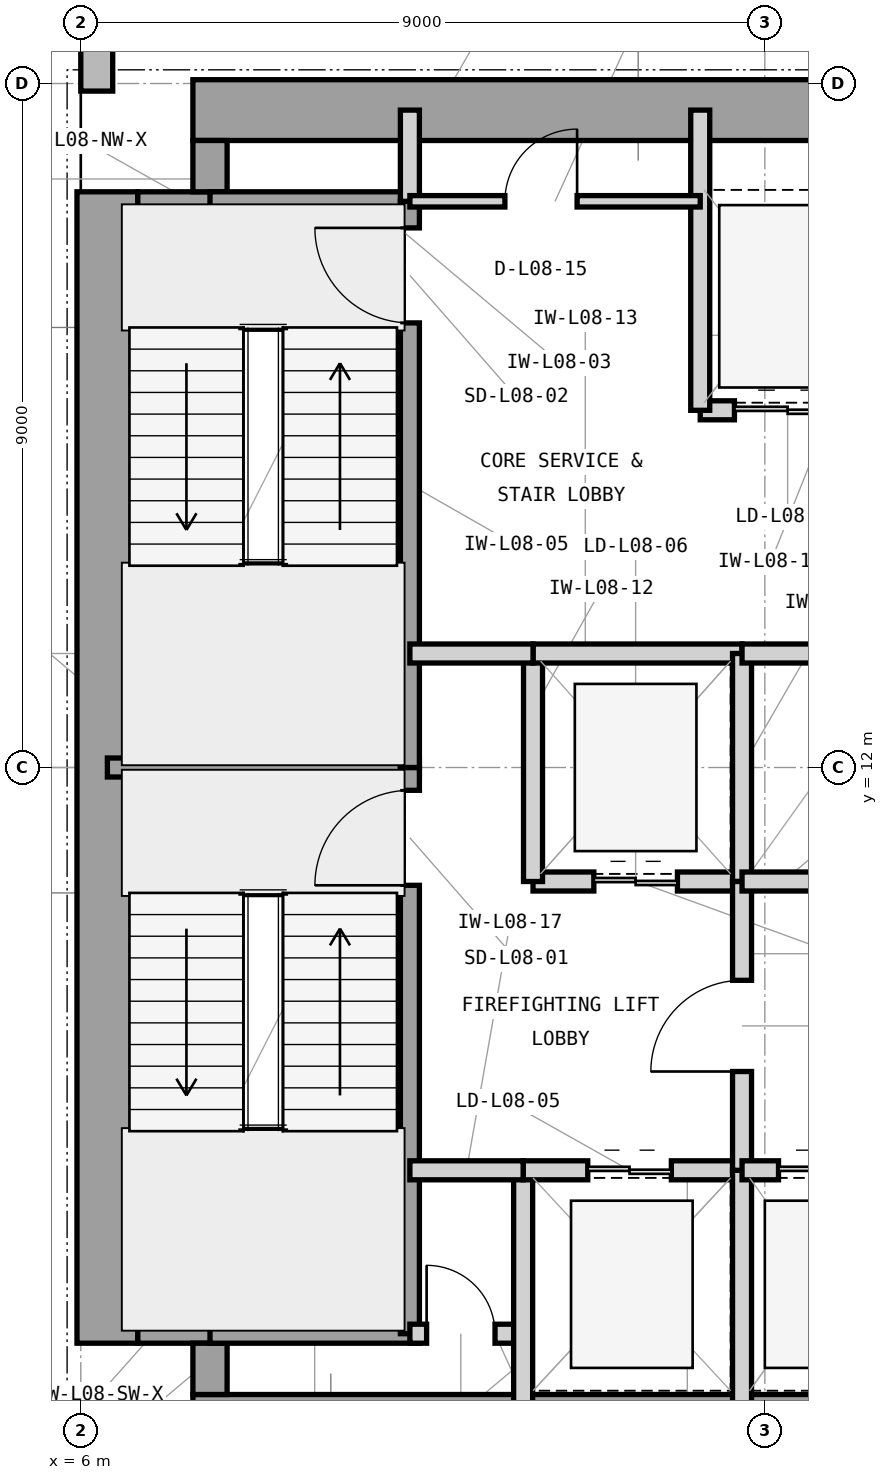
"""IFC4 building model, lengths in metres.
Left out: names, types, materials, properties, quantities, classifications, styles, units other than length and angle.
Written with IfcOpenShell. Run it as: python <this file> out.ifc"""

import sys

from ifc_helpers import new_model, si_unit, direction, frame, frame_2d, origin, place, context, subcontext, project, spatial, rectangle, extrude, element, fill, save


model = new_model("IFC4")
c1 = context("Model", 3, precision=1e-05, world=origin(), true_north=direction((0.0, 1.0)))
c2 = subcontext(c1, "Body", "Model", "MODEL_VIEW")
j1 = project(units=[si_unit("LENGTHUNIT", "METRE"), si_unit("PLANEANGLEUNIT", "RADIAN")], contexts=[c1])
p1 = place(None, origin())
s1 = spatial("IfcSite", under=j1, at=p1, CompositionType="ELEMENT")
p2 = place(p1, origin())
s2 = spatial("IfcBuilding", under=s1, at=p2, CompositionType="ELEMENT")
p3 = place(p2, frame((0.0, 0.0, 38.4)))
s3 = spatial("IfcBuildingStorey", under=s2, at=p3, CompositionType="ELEMENT", Elevation=38.4)
p4 = place(p3, frame((7.475, 3.35, 0.0), z_axis=(0.0, 0.0, 1.0), x_axis=(1.0, 0.0, 0.0)))
e1 = element("IfcWall", 1, at=p4, inside=s3, PredefinedType="SHEAR", context=c2, shape_type="SweptSolid", body=[
    extrude(rectangle(XDim=16.575, YDim=0.8, at=frame_2d((8.288, 0.0))), origin(), (0.0, 0.0, 1.0), 4.2),
])
p5 = place(p3, frame((6.35, 4.425, 0.0), z_axis=(0.0, 0.0, 1.0), x_axis=(0.0, 1.0, 0.0)))
e2 = element("IfcWall", 2, at=p5, inside=s3, PredefinedType="SHEAR", context=c2, shape_type="SweptSolid", body=[
    extrude(rectangle(XDim=15.15, YDim=0.8, at=frame_2d((7.575, 0.0))), origin(), (0.0, 0.0, 1.0), 4.2),
])
p6 = place(p3, frame((7.475, 20.65, 0.0), z_axis=(0.0, 0.0, 1.0), x_axis=(1.0, 0.0, 0.0)))
e3 = element("IfcWall", 3, at=p6, inside=s3, PredefinedType="SHEAR", context=c2, shape_type="SweptSolid", body=[
    extrude(rectangle(XDim=12.325, YDim=0.8, at=frame_2d((6.163, 0.0))), origin(), (0.0, 0.0, 1.0), 4.2),
])
p7 = place(p3, frame((6.75, 4.65, 0.0), z_axis=(0.0, 0.0, 1.0), x_axis=(1.0, 0.0, 0.0)))
e4 = element("IfcWall", 4, at=p7, inside=s3, PredefinedType="SHEAR", context=c2, shape_type="SweptSolid", body=[
    extrude(rectangle(XDim=1.175, YDim=0.45, at=frame_2d((0.587, 0.0))), origin(), (0.0, 0.0, 1.0), 4.2),
])
p8 = place(p3, frame((7.7, 3.75, 0.0), z_axis=(0.0, 0.0, 1.0), x_axis=(0.0, 1.0, 0.0)))
e5 = element("IfcWall", 5, at=p8, inside=s3, PredefinedType="SHEAR", context=c2, shape_type="SweptSolid", body=[
    extrude(rectangle(XDim=0.675, YDim=0.45, at=frame_2d((0.337, 0.0))), origin(), (0.0, 0.0, 1.0), 4.2),
])
p9 = place(p3, frame((6.75, 19.35, 0.0), z_axis=(0.0, 0.0, 1.0), x_axis=(1.0, 0.0, 0.0)))
e6 = element("IfcWall", 6, at=p9, inside=s3, PredefinedType="SHEAR", context=c2, shape_type="SweptSolid", body=[
    extrude(rectangle(XDim=1.175, YDim=0.45, at=frame_2d((0.587, 0.0))), origin(), (0.0, 0.0, 1.0), 4.2),
])
p10 = place(p3, frame((7.7, 19.575, 0.0), z_axis=(0.0, 0.0, 1.0), x_axis=(0.0, 1.0, 0.0)))
e7 = element("IfcWall", 7, at=p10, inside=s3, PredefinedType="SHEAR", context=c2, shape_type="SweptSolid", body=[
    extrude(rectangle(XDim=0.675, YDim=0.45, at=frame_2d((0.337, 0.0))), origin(), (0.0, 0.0, 1.0), 4.2),
])
p11 = place(p3, frame((6.21, 49.4, 0.0), z_axis=(0.0, 0.0, 1.0), x_axis=(0.0, -1.0, 0.0)))
e8 = element("IfcWall", 8, at=p11, inside=s3, PredefinedType="STANDARD", context=c2, shape_type="SweptSolid", body=[
    extrude(rectangle(XDim=28.5, YDim=0.42, at=frame_2d((14.25, 0.0))), origin(), (0.0, 0.0, 1.0), 3.98),
])
p12 = place(p11, frame((15.225, 0.0, 0.85)))
e9 = element("IfcOpeningElement", 9, at=p12, cuts=e8, PredefinedType="OPENING", context=c2, shape_type="SweptSolid", body=[
    extrude(rectangle(XDim=2.8, YDim=2.45, at=frame_2d((1.4, 1.225))), frame((0.0, 0.22, 0.0), z_axis=(0.0, -1.0, 0.0), x_axis=(1.0, 0.0, 0.0)), (0.0, 0.0, 1.0), 0.44),
])
p13 = place(p3, frame((6.35, 12.0, 0.0), z_axis=(0.0, 0.0, 1.0), x_axis=(1.0, 0.0, 0.0)))
e10 = element("IfcWall", 10, at=p13, inside=s3, PredefinedType="SHEAR", context=c2, shape_type="SweptSolid", body=[
    extrude(rectangle(XDim=4.105, YDim=0.25, at=frame_2d((2.052, 0.0))), origin(), (0.0, 0.0, 1.0), 4.2),
])
for number, where, z_axis, x_axis in (
    (11, (7.7, 4.55, 0.0), (0.0, 0.0, 1.0), (1.0, 0.0, 0.0)),
    (12, (7.7, 19.45, 0.0), (0.0, 0.0, 1.0), (1.0, 0.0, 0.0)),
):
    element("IfcWall", number, at=place(p3, frame(where, z_axis=z_axis, x_axis=x_axis)), inside=s3, PredefinedType="SHEAR", context=c2, shape_type="SweptSolid", body=[
        extrude(rectangle(XDim=2.755, YDim=0.25, at=frame_2d((1.377, 0.0))), origin(), (0.0, 0.0, 1.0), 4.2),
    ])
p14 = place(p3, frame((10.33, 4.55, 0.0), z_axis=(0.0, 0.0, 1.0), x_axis=(0.0, 1.0, 0.0)))
e13 = element("IfcWall", 13, at=p14, inside=s3, PredefinedType="SHEAR", context=c2, shape_type="SweptSolid", body=[
    extrude(rectangle(XDim=7.45, YDim=0.25, at=frame_2d((3.725, 0.0))), origin(), (0.0, 0.0, 1.0), 4.2),
])
p15 = place(p14, frame((5.9, 0.0, 0.0)))
e14 = element("IfcOpeningElement", 14, at=p15, cuts=e13, PredefinedType="OPENING", context=c2, shape_type="SweptSolid", body=[
    extrude(rectangle(XDim=1.25, YDim=2.2, at=frame_2d((0.625, 1.1))), frame((0.0, 0.135, 0.0), z_axis=(0.0, -1.0, 0.0), x_axis=(1.0, 0.0, 0.0)), (0.0, 0.0, 1.0), 0.27),
])
p16 = place(p3, frame((10.33, 12.0, 0.0), z_axis=(0.0, 0.0, 1.0), x_axis=(0.0, 1.0, 0.0)))
e15 = element("IfcWall", 15, at=p16, inside=s3, PredefinedType="SHEAR", context=c2, shape_type="SweptSolid", body=[
    extrude(rectangle(XDim=7.45, YDim=0.25, at=frame_2d((3.725, 0.0))), origin(), (0.0, 0.0, 1.0), 4.2),
])
p17 = place(p16, frame((5.85, 0.0, 0.0)))
e16 = element("IfcOpeningElement", 16, at=p17, cuts=e15, PredefinedType="OPENING", context=c2, shape_type="SweptSolid", body=[
    extrude(rectangle(XDim=1.25, YDim=2.2, at=frame_2d((0.625, 1.1))), frame((0.0, 0.135, 0.0), z_axis=(0.0, -1.0, 0.0), x_axis=(1.0, 0.0, 0.0)), (0.0, 0.0, 1.0), 0.27),
])
p18 = place(p3, frame((10.33, 4.55, 0.0), z_axis=(0.0, 0.0, 1.0), x_axis=(1.0, 0.0, 0.0)))
e17 = element("IfcWall", 17, at=p18, inside=s3, PredefinedType="PARTITIONING", context=c2, shape_type="SweptSolid", body=[
    extrude(rectangle(XDim=1.49, YDim=0.25, at=frame_2d((0.745, 0.0))), origin(), (0.0, 0.0, 1.0), 3.97),
])
p19 = place(p18, frame((0.22, 0.0, 0.0)))
e18 = element("IfcOpeningElement", 18, at=p19, cuts=e17, PredefinedType="OPENING", context=c2, shape_type="SweptSolid", body=[
    extrude(rectangle(XDim=0.9, YDim=2.1, at=frame_2d((0.45, 1.05))), frame((0.0, 0.135, 0.0), z_axis=(0.0, -1.0, 0.0), x_axis=(1.0, 0.0, 0.0)), (0.0, 0.0, 1.0), 0.27),
])
p20 = place(p3, frame((11.82, 3.35, 0.0), z_axis=(0.0, 0.0, 1.0), x_axis=(0.0, 1.0, 0.0)))
e19 = element("IfcWall", 19, at=p20, inside=s3, PredefinedType="PARTITIONING", context=c2, shape_type="SweptSolid", body=[
    extrude(rectangle(XDim=3.35, YDim=0.25, at=frame_2d((1.675, 0.0))), origin(), (0.0, 0.0, 1.0), 3.97),
])
p21 = place(p3, frame((10.33, 19.45, 0.0), z_axis=(0.0, 0.0, 1.0), x_axis=(0.0, 1.0, 0.0)))
e20 = element("IfcWall", 20, at=p21, inside=s3, PredefinedType="PARTITIONING", context=c2, shape_type="SweptSolid", body=[
    extrude(rectangle(XDim=1.2, YDim=0.25, at=frame_2d((0.6, 0.0))), origin(), (0.0, 0.0, 1.0), 3.114),
])
p22 = place(p3, frame((11.82, 6.7, 0.0), z_axis=(0.0, 0.0, 1.0), x_axis=(1.0, 0.0, 0.0)))
e21 = element("IfcWall", 21, at=p22, inside=s3, PredefinedType="PARTITIONING", context=c2, shape_type="SweptSolid", body=[
    extrude(rectangle(XDim=2.88, YDim=0.25, at=frame_2d((1.44, 0.0))), origin(), (0.0, 0.0, 1.0), 3.426),
])
p23 = place(p22, frame((0.85, 0.0, 0.0)))
e22 = element("IfcOpeningElement", 22, at=p23, cuts=e21, PredefinedType="OPENING", context=c2, shape_type="SweptSolid", body=[
    extrude(rectangle(XDim=1.1, YDim=2.25, at=frame_2d((0.55, 1.125))), frame((0.0, 0.135, 0.0), z_axis=(0.0, -1.0, 0.0), x_axis=(1.0, 0.0, 0.0)), (0.0, 0.0, 1.0), 0.27),
])
p24 = place(p3, frame((14.7, 3.35, 0.0), z_axis=(0.0, 0.0, 1.0), x_axis=(0.0, 1.0, 0.0)))
e23 = element("IfcWall", 23, at=p24, inside=s3, PredefinedType="PARTITIONING", context=c2, shape_type="SweptSolid", body=[
    extrude(rectangle(XDim=3.35, YDim=0.25, at=frame_2d((1.675, 0.0))), origin(), (0.0, 0.0, 1.0), 3.97),
])
p25 = place(p3, frame((11.95, 10.5, 0.0), z_axis=(0.0, 0.0, 1.0), x_axis=(1.0, 0.0, 0.0)))
e24 = element("IfcWall", 24, at=p25, inside=s3, PredefinedType="PARTITIONING", context=c2, shape_type="SweptSolid", body=[
    extrude(rectangle(XDim=2.75, YDim=0.25, at=frame_2d((1.375, 0.0))), origin(), (0.0, 0.0, 1.0), 3.426),
])
p26 = place(p25, frame((0.8, 0.0, 0.0)))
e25 = element("IfcOpeningElement", 25, at=p26, cuts=e24, PredefinedType="OPENING", context=c2, shape_type="SweptSolid", body=[
    extrude(rectangle(XDim=1.1, YDim=2.25, at=frame_2d((0.55, 1.125))), frame((0.0, 0.135, 0.0), z_axis=(0.0, -1.0, 0.0), x_axis=(1.0, 0.0, 0.0)), (0.0, 0.0, 1.0), 0.27),
])
p27 = place(p3, frame((11.95, 10.5, 0.0), z_axis=(0.0, 0.0, 1.0), x_axis=(0.0, 1.0, 0.0)))
e26 = element("IfcWall", 26, at=p27, inside=s3, PredefinedType="PARTITIONING", context=c2, shape_type="SweptSolid", body=[
    extrude(rectangle(XDim=3.0, YDim=0.25, at=frame_2d((1.5, 0.0))), origin(), (0.0, 0.0, 1.0), 3.97),
])
p28 = place(p3, frame((11.95, 13.5, 0.0), z_axis=(0.0, 0.0, 1.0), x_axis=(1.0, 0.0, 0.0)))
e27 = element("IfcWall", 27, at=p28, inside=s3, PredefinedType="PARTITIONING", context=c2, shape_type="SweptSolid", body=[
    extrude(rectangle(XDim=2.75, YDim=0.25, at=frame_2d((1.375, 0.0))), origin(), (0.0, 0.0, 1.0), 3.426),
])
p29 = place(p3, frame((14.7, 10.5, 0.0), z_axis=(0.0, 0.0, 1.0), x_axis=(0.0, 1.0, 0.0)))
e28 = element("IfcWall", 28, at=p29, inside=s3, PredefinedType="PARTITIONING", context=c2, shape_type="SweptSolid", body=[
    extrude(rectangle(XDim=3.0, YDim=0.25, at=frame_2d((1.5, 0.0))), origin(), (0.0, 0.0, 1.0), 3.97),
])
p30 = place(p3, frame((14.7, 6.7, 0.0), z_axis=(0.0, 0.0, 1.0), x_axis=(0.0, 1.0, 0.0)))
e29 = element("IfcWall", 29, at=p30, inside=s3, PredefinedType="PARTITIONING", context=c2, shape_type="SweptSolid", body=[
    extrude(rectangle(XDim=3.8, YDim=0.25, at=frame_2d((1.9, 0.0))), origin(), (0.0, 0.0, 1.0), 3.97),
])
p31 = place(p30, frame((1.3, 0.0, 0.0)))
e30 = element("IfcOpeningElement", 30, at=p31, cuts=e29, PredefinedType="OPENING", context=c2, shape_type="SweptSolid", body=[
    extrude(rectangle(XDim=1.2, YDim=2.2, at=frame_2d((0.6, 1.1))), frame((0.0, 0.135, 0.0), z_axis=(0.0, -1.0, 0.0), x_axis=(1.0, 0.0, 0.0)), (0.0, 0.0, 1.0), 0.27),
])
p32 = place(p3, frame((10.33, 13.5, 0.0), z_axis=(0.0, 0.0, 1.0), x_axis=(1.0, 0.0, 0.0)))
e31 = element("IfcWall", 31, at=p32, inside=s3, PredefinedType="PARTITIONING", context=c2, shape_type="SweptSolid", body=[
    extrude(rectangle(XDim=1.62, YDim=0.25, at=frame_2d((0.81, 0.0))), origin(), (0.0, 0.0, 1.0), 3.426),
])
p33 = place(p3, frame((10.33, 6.7, 0.0), z_axis=(0.0, 0.0, 1.0), x_axis=(1.0, 0.0, 0.0)))
e32 = element("IfcWall", 32, at=p33, inside=s3, PredefinedType="PARTITIONING", context=c2, shape_type="SweptSolid", body=[
    extrude(rectangle(XDim=1.49, YDim=0.25, at=frame_2d((0.745, 0.0))), origin(), (0.0, 0.0, 1.0), 3.426),
])
p34 = place(p3, frame((14.15, 16.7, 0.0), z_axis=(0.0, 0.0, 1.0), x_axis=(1.0, 0.0, 0.0)))
e33 = element("IfcWall", 33, at=p34, inside=s3, PredefinedType="PARTITIONING", context=c2, shape_type="SweptSolid", body=[
    extrude(rectangle(XDim=2.3, YDim=0.25, at=frame_2d((1.15, 0.0))), origin(), (0.0, 0.0, 1.0), 3.426),
])
p35 = place(p34, frame((0.45, 0.0, 0.0)))
e34 = element("IfcOpeningElement", 34, at=p35, cuts=e33, PredefinedType="OPENING", context=c2, shape_type="SweptSolid", body=[
    extrude(rectangle(XDim=1.4, YDim=2.35, at=frame_2d((0.7, 1.175))), frame((0.0, 0.135, 0.0), z_axis=(0.0, -1.0, 0.0), x_axis=(1.0, 0.0, 0.0)), (0.0, 0.0, 1.0), 0.27),
])
p36 = place(p3, frame((14.15, 16.7, 0.0), z_axis=(0.0, 0.0, 1.0), x_axis=(0.0, 1.0, 0.0)))
e35 = element("IfcWall", 35, at=p36, inside=s3, PredefinedType="PARTITIONING", context=c2, shape_type="SweptSolid", body=[
    extrude(rectangle(XDim=3.95, YDim=0.25, at=frame_2d((1.975, 0.0))), origin(), (0.0, 0.0, 1.0), 3.97),
])
p37 = place(p3, frame((14.7, 6.7, 0.0), z_axis=(0.0, 0.0, 1.0), x_axis=(1.0, 0.0, 0.0)))
e36 = element("IfcWall", 36, at=p37, inside=s3, PredefinedType="PARTITIONING", context=c2, shape_type="SweptSolid", body=[
    extrude(rectangle(XDim=2.15, YDim=0.25, at=frame_2d((1.075, 0.0))), origin(), (0.0, 0.0, 1.0), 3.426),
])
p38 = place(p37, frame((0.48, 0.0, 0.0)))
e37 = element("IfcOpeningElement", 37, at=p38, cuts=e36, PredefinedType="OPENING", context=c2, shape_type="SweptSolid", body=[
    extrude(rectangle(XDim=1.15, YDim=2.25, at=frame_2d((0.575, 1.125))), frame((0.0, 0.135, 0.0), z_axis=(0.0, -1.0, 0.0), x_axis=(1.0, 0.0, 0.0)), (0.0, 0.0, 1.0), 0.27),
])
p39 = place(p3, frame((14.7, 10.5, 0.0), z_axis=(0.0, 0.0, 1.0), x_axis=(1.0, 0.0, 0.0)))
e38 = element("IfcWall", 38, at=p39, inside=s3, PredefinedType="PARTITIONING", context=c2, shape_type="SweptSolid", body=[
    extrude(rectangle(XDim=2.15, YDim=0.25, at=frame_2d((1.075, 0.0))), origin(), (0.0, 0.0, 1.0), 3.426),
])
p40 = place(p3, frame((14.7, 13.5, 0.0), z_axis=(0.0, 0.0, 1.0), x_axis=(1.0, 0.0, 0.0)))
e39 = element("IfcWall", 39, at=p40, inside=s3, PredefinedType="PARTITIONING", context=c2, shape_type="SweptSolid", body=[
    extrude(rectangle(XDim=8.95, YDim=0.25, at=frame_2d((4.475, 0.0))), origin(), (0.0, 0.0, 1.0), 3.426),
])
p41 = place(p3, frame((10.33, 19.45, 0.0), z_axis=(0.0, 0.0, 1.0), x_axis=(1.0, 0.0, 0.0)))
e40 = element("IfcWall", 40, at=p41, inside=s3, PredefinedType="PARTITIONING", context=c2, shape_type="SweptSolid", body=[
    extrude(rectangle(XDim=3.82, YDim=0.15, at=frame_2d((1.91, 0.0))), origin(), (0.0, 0.0, 1.0), 3.97),
])
p42 = place(p41, frame((1.25, 0.0, 0.0)))
e41 = element("IfcOpeningElement", 41, at=p42, cuts=e40, PredefinedType="OPENING", context=c2, shape_type="SweptSolid", body=[
    extrude(rectangle(XDim=0.95, YDim=2.1, at=frame_2d((0.475, 1.05))), frame((0.0, 0.085, 0.0), z_axis=(0.0, -1.0, 0.0), x_axis=(1.0, 0.0, 0.0)), (0.0, 0.0, 1.0), 0.17),
])
p43 = place(p15, origin())
e42 = element("IfcDoor", 42, at=p43, inside=s3, OperationType="SINGLE_SWING_LEFT", PredefinedType="DOOR", context=c2, shape_type="SweptSolid", body=[
    extrude(rectangle(XDim=1.25, YDim=2.2, at=frame_2d((0.625, 1.1))), frame((0.0, 0.025, 0.0), z_axis=(0.0, -1.0, 0.0), x_axis=(1.0, 0.0, 0.0)), (0.0, 0.0, 1.0), 0.05),
])
fill(e14, e42)
p44 = place(p17, origin())
e43 = element("IfcDoor", 43, at=p44, inside=s3, OperationType="SINGLE_SWING_RIGHT", PredefinedType="DOOR", context=c2, shape_type="SweptSolid", body=[
    extrude(rectangle(XDim=1.25, YDim=2.2, at=frame_2d((0.625, 1.1))), frame((0.0, 0.025, 0.0), z_axis=(0.0, -1.0, 0.0), x_axis=(1.0, 0.0, 0.0)), (0.0, 0.0, 1.0), 0.05),
])
fill(e16, e43)
p45 = place(p19, origin())
e44 = element("IfcDoor", 44, at=p45, inside=s3, OperationType="SINGLE_SWING_LEFT", PredefinedType="TRAPDOOR", context=c2, shape_type="SweptSolid", body=[
    extrude(rectangle(XDim=0.9, YDim=2.1, at=frame_2d((0.45, 1.05))), frame((0.0, 0.025, 0.0), z_axis=(0.0, -1.0, 0.0), x_axis=(1.0, 0.0, 0.0)), (0.0, 0.0, 1.0), 0.05),
])
fill(e18, e44)
p46 = place(p23, origin())
e45 = element("IfcDoor", 45, at=p46, inside=s3, OperationType="DOUBLE_DOOR_SLIDING", PredefinedType="DOOR", context=c2, shape_type="SweptSolid", body=[
    extrude(rectangle(XDim=1.1, YDim=2.25, at=frame_2d((0.55, 1.125))), frame((0.0, 0.025, 0.0), z_axis=(0.0, -1.0, 0.0), x_axis=(1.0, 0.0, 0.0)), (0.0, 0.0, 1.0), 0.05),
])
fill(e22, e45)
p47 = place(p26, origin())
e46 = element("IfcDoor", 46, at=p47, inside=s3, OperationType="DOUBLE_DOOR_SLIDING", PredefinedType="DOOR", context=c2, shape_type="SweptSolid", body=[
    extrude(rectangle(XDim=1.1, YDim=2.25, at=frame_2d((0.55, 1.125))), frame((0.0, 0.025, 0.0), z_axis=(0.0, -1.0, 0.0), x_axis=(1.0, 0.0, 0.0)), (0.0, 0.0, 1.0), 0.05),
])
fill(e25, e46)
p48 = place(p31, origin())
e47 = element("IfcDoor", 47, at=p48, inside=s3, OperationType="SINGLE_SWING_LEFT", PredefinedType="DOOR", context=c2, shape_type="SweptSolid", body=[
    extrude(rectangle(XDim=1.2, YDim=2.2, at=frame_2d((0.6, 1.1))), frame((0.0, 0.025, 0.0), z_axis=(0.0, -1.0, 0.0), x_axis=(1.0, 0.0, 0.0)), (0.0, 0.0, 1.0), 0.05),
])
fill(e30, e47)
p49 = place(p35, origin())
e48 = element("IfcDoor", 48, at=p49, inside=s3, OperationType="DOUBLE_DOOR_SLIDING", PredefinedType="DOOR", context=c2, shape_type="SweptSolid", body=[
    extrude(rectangle(XDim=1.4, YDim=2.35, at=frame_2d((0.7, 1.175))), frame((0.0, 0.025, 0.0), z_axis=(0.0, -1.0, 0.0), x_axis=(1.0, 0.0, 0.0)), (0.0, 0.0, 1.0), 0.05),
])
fill(e34, e48)
p50 = place(p38, origin())
e49 = element("IfcDoor", 49, at=p50, inside=s3, OperationType="DOUBLE_DOOR_SLIDING", PredefinedType="DOOR", context=c2, shape_type="SweptSolid", body=[
    extrude(rectangle(XDim=1.15, YDim=2.25, at=frame_2d((0.575, 1.125))), frame((0.0, 0.025, 0.0), z_axis=(0.0, -1.0, 0.0), x_axis=(1.0, 0.0, 0.0)), (0.0, 0.0, 1.0), 0.05),
])
fill(e37, e49)
p51 = place(p42, origin())
e50 = element("IfcDoor", 50, at=p51, inside=s3, OperationType="SINGLE_SWING_RIGHT", PredefinedType="DOOR", context=c2, shape_type="SweptSolid", body=[
    extrude(rectangle(XDim=0.95, YDim=2.1, at=frame_2d((0.475, 1.05))), frame((0.0, 0.025, 0.0), z_axis=(0.0, -1.0, 0.0), x_axis=(1.0, 0.0, 0.0)), (0.0, 0.0, 1.0), 0.05),
])
fill(e41, e50)
save(model, sys.argv[1])
